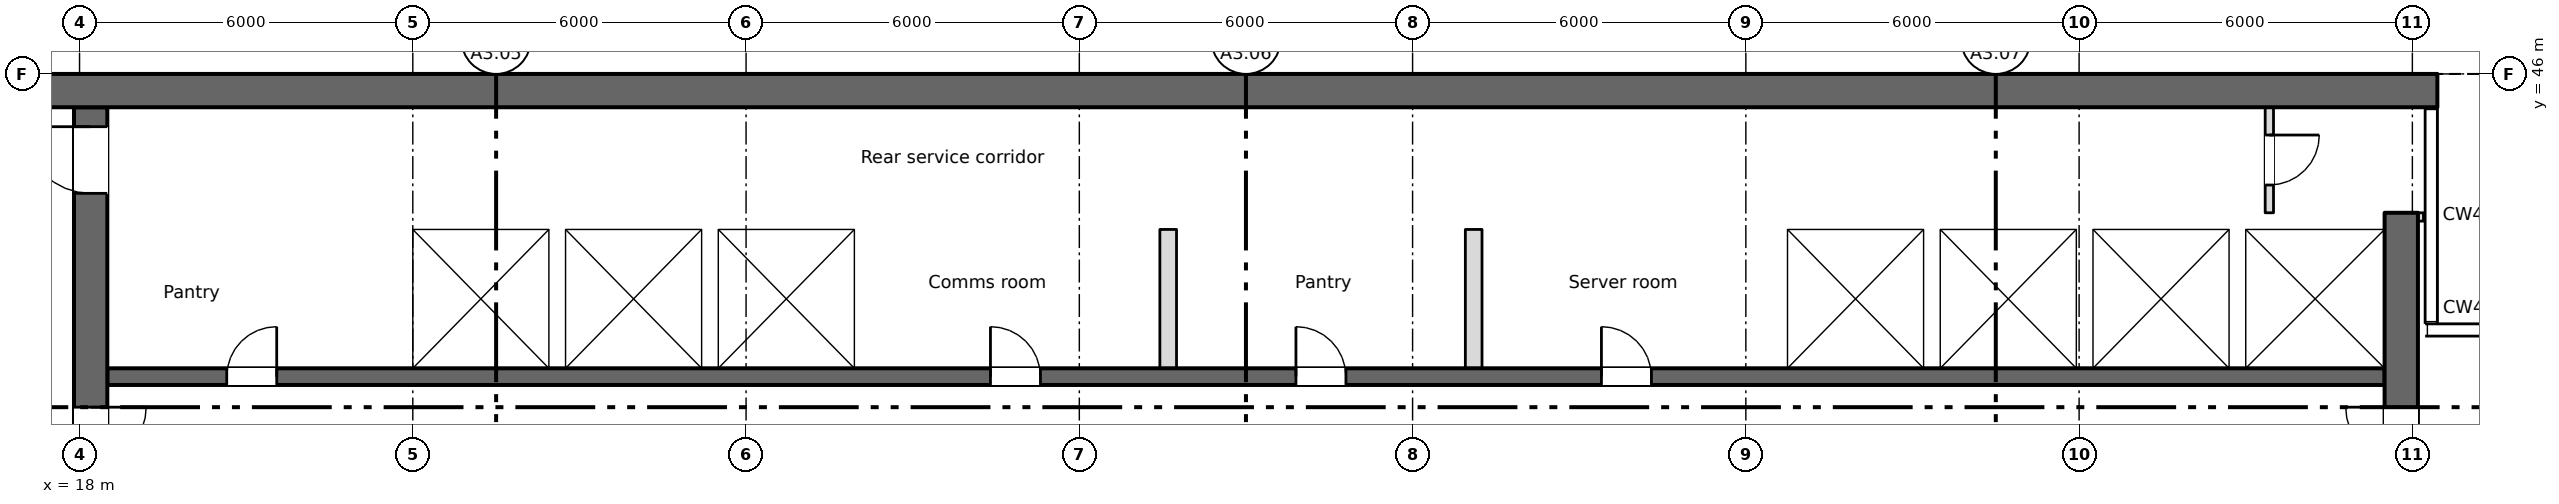
"""IFC4 building model, lengths in metres.
Left out: names, types, materials, properties, quantities, classifications, styles, units other than length and angle.
Written with IfcOpenShell. Run it as: python <this file> out.ifc"""

import sys

from ifc_helpers import new_model, si_unit, direction, frame, frame_2d, origin, place, context, subcontext, project, spatial, rectangle, extrude, element, fill, save


model = new_model("IFC4")
c1 = context("Model", 3, precision=1e-05, world=origin(), true_north=direction((0.0, 1.0)))
c2 = subcontext(c1, "Body", "Model", "MODEL_VIEW")
j1 = project(units=[si_unit("LENGTHUNIT", "METRE"), si_unit("PLANEANGLEUNIT", "RADIAN")], contexts=[c1])
p1 = place(None, origin())
s1 = spatial("IfcSite", under=j1, at=p1, CompositionType="ELEMENT")
p2 = place(p1, origin())
s2 = spatial("IfcBuilding", under=s1, at=p2, CompositionType="ELEMENT")
p3 = place(p2, frame((0.0, 0.0, 246.95)))
s3 = spatial("IfcBuildingStorey", under=s2, at=p3, CompositionType="ELEMENT", Elevation=246.95)
p4 = place(p3, frame((11.55, 45.7, 0.0), z_axis=(0.0, 0.0, 1.0), x_axis=(1.0, 0.0, 0.0)))
e1 = element("IfcWall", 1, at=p4, inside=s3, PredefinedType="SHEAR", context=c2, shape_type="SweptSolid", body=[
    extrude(rectangle(XDim=48.9, YDim=0.6, at=frame_2d((24.45, 0.0))), origin(), (0.0, 0.0, 1.0), 3.4),
])
p5 = place(p4, frame((1.2, 0.0, 0.6)))
e2 = element("IfcOpeningElement", 2, at=p5, cuts=e1, PredefinedType="OPENING", context=c2, shape_type="SweptSolid", body=[
    extrude(rectangle(XDim=0.6, YDim=2.4, at=frame_2d((0.3, 1.2))), frame((0.0, 0.31, 0.0), z_axis=(0.0, -1.0, 0.0), x_axis=(1.0, 0.0, 0.0)), (0.0, 0.0, 1.0), 0.62),
])
p6 = place(p3, frame((18.2, 28.4, 0.0), z_axis=(0.0, 0.0, 1.0), x_axis=(0.0, 1.0, 0.0)))
e3 = element("IfcWall", 3, at=p6, inside=s3, PredefinedType="SHEAR", context=c2, shape_type="SweptSolid", body=[
    extrude(rectangle(XDim=17.0, YDim=0.6, at=frame_2d((8.5, 0.0))), origin(), (0.0, 0.0, 1.0), 3.4),
])
p7 = place(p6, frame((9.6, 0.0, 0.0)))
e4 = element("IfcOpeningElement", 4, at=p7, cuts=e3, PredefinedType="OPENING", context=c2, shape_type="SweptSolid", body=[
    extrude(rectangle(XDim=2.0, YDim=2.1, at=frame_2d((1.0, 1.05))), frame((0.0, 0.31, 0.0), z_axis=(0.0, -1.0, 0.0), x_axis=(1.0, 0.0, 0.0)), (0.0, 0.0, 1.0), 0.62),
])
p8 = place(p6, frame((15.45, 0.0, 0.0)))
e5 = element("IfcOpeningElement", 5, at=p8, cuts=e3, PredefinedType="OPENING", context=c2, shape_type="SweptSolid", body=[
    extrude(rectangle(XDim=1.2, YDim=2.1, at=frame_2d((0.6, 1.05))), frame((0.0, 0.31, 0.0), z_axis=(0.0, -1.0, 0.0), x_axis=(1.0, 0.0, 0.0)), (0.0, 0.0, 1.0), 0.62),
])
p9 = place(p3, frame((59.8, 28.4, 0.0), z_axis=(0.0, 0.0, 1.0), x_axis=(0.0, 1.0, 0.0)))
e6 = element("IfcWall", 6, at=p9, inside=s3, PredefinedType="SHEAR", context=c2, shape_type="SweptSolid", body=[
    extrude(rectangle(XDim=15.1, YDim=0.6, at=frame_2d((7.55, 0.0))), origin(), (0.0, 0.0, 1.0), 3.4),
])
p10 = place(p9, frame((9.6, 0.0, 0.0)))
e7 = element("IfcOpeningElement", 7, at=p10, cuts=e6, PredefinedType="OPENING", context=c2, shape_type="SweptSolid", body=[
    extrude(rectangle(XDim=2.0, YDim=2.1, at=frame_2d((1.0, 1.05))), frame((0.0, 0.31, 0.0), z_axis=(0.0, -1.0, 0.0), x_axis=(1.0, 0.0, 0.0)), (0.0, 0.0, 1.0), 0.62),
])
p11 = place(p3, frame((18.5, 40.55, 0.0), z_axis=(0.0, 0.0, 1.0), x_axis=(1.0, 0.0, 0.0)))
e8 = element("IfcWall", 8, at=p11, inside=s3, PredefinedType="SHEAR", context=c2, shape_type="SweptSolid", body=[
    extrude(rectangle(XDim=41.0, YDim=0.3, at=frame_2d((20.5, 0.0))), origin(), (0.0, 0.0, 1.0), 3.4),
])
p12 = place(p11, frame((2.15, 0.0, 0.0)))
e9 = element("IfcOpeningElement", 9, at=p12, cuts=e8, PredefinedType="OPENING", context=c2, shape_type="SweptSolid", body=[
    extrude(rectangle(XDim=0.9, YDim=2.1, at=frame_2d((0.45, 1.05))), frame((0.0, 0.16, 0.0), z_axis=(0.0, -1.0, 0.0), x_axis=(1.0, 0.0, 0.0)), (0.0, 0.0, 1.0), 0.32),
])
p13 = place(p11, frame((15.9, 0.0, 0.0)))
e10 = element("IfcOpeningElement", 10, at=p13, cuts=e8, PredefinedType="OPENING", context=c2, shape_type="SweptSolid", body=[
    extrude(rectangle(XDim=0.9, YDim=2.1, at=frame_2d((0.45, 1.05))), frame((0.0, 0.16, 0.0), z_axis=(0.0, -1.0, 0.0), x_axis=(1.0, 0.0, 0.0)), (0.0, 0.0, 1.0), 0.32),
])
p14 = place(p11, frame((21.4, 0.0, 0.0)))
e11 = element("IfcOpeningElement", 11, at=p14, cuts=e8, PredefinedType="OPENING", context=c2, shape_type="SweptSolid", body=[
    extrude(rectangle(XDim=0.9, YDim=2.1, at=frame_2d((0.45, 1.05))), frame((0.0, 0.16, 0.0), z_axis=(0.0, -1.0, 0.0), x_axis=(1.0, 0.0, 0.0)), (0.0, 0.0, 1.0), 0.32),
])
p15 = place(p11, frame((26.9, 0.0, 0.0)))
e12 = element("IfcOpeningElement", 12, at=p15, cuts=e8, PredefinedType="OPENING", context=c2, shape_type="SweptSolid", body=[
    extrude(rectangle(XDim=0.9, YDim=2.1, at=frame_2d((0.45, 1.05))), frame((0.0, 0.16, 0.0), z_axis=(0.0, -1.0, 0.0), x_axis=(1.0, 0.0, 0.0)), (0.0, 0.0, 1.0), 0.32),
])
p16 = place(p11, frame((6.175, 0.0, 0.0)))
e13 = element("IfcOpeningElement", 13, at=p16, cuts=e8, PredefinedType="OPENING", context=c2, shape_type="SweptSolid", body=[
    extrude(rectangle(XDim=1.1, YDim=2.1, at=frame_2d((0.55, 1.05))), frame((0.0, 0.16, 0.0), z_axis=(0.0, -1.0, 0.0), x_axis=(1.0, 0.0, 0.0)), (0.0, 0.0, 1.0), 0.32),
])
p17 = place(p11, frame((8.925, 0.0, 0.0)))
e14 = element("IfcOpeningElement", 14, at=p17, cuts=e8, PredefinedType="OPENING", context=c2, shape_type="SweptSolid", body=[
    extrude(rectangle(XDim=1.1, YDim=2.1, at=frame_2d((0.55, 1.05))), frame((0.0, 0.16, 0.0), z_axis=(0.0, -1.0, 0.0), x_axis=(1.0, 0.0, 0.0)), (0.0, 0.0, 1.0), 0.32),
])
p18 = place(p11, frame((11.675, 0.0, 0.0)))
e15 = element("IfcOpeningElement", 15, at=p18, cuts=e8, PredefinedType="OPENING", context=c2, shape_type="SweptSolid", body=[
    extrude(rectangle(XDim=1.1, YDim=2.1, at=frame_2d((0.55, 1.05))), frame((0.0, 0.16, 0.0), z_axis=(0.0, -1.0, 0.0), x_axis=(1.0, 0.0, 0.0)), (0.0, 0.0, 1.0), 0.32),
])
p19 = place(p11, frame((30.925, 0.0, 0.0)))
e16 = element("IfcOpeningElement", 16, at=p19, cuts=e8, PredefinedType="OPENING", context=c2, shape_type="SweptSolid", body=[
    extrude(rectangle(XDim=1.1, YDim=2.1, at=frame_2d((0.55, 1.05))), frame((0.0, 0.16, 0.0), z_axis=(0.0, -1.0, 0.0), x_axis=(1.0, 0.0, 0.0)), (0.0, 0.0, 1.0), 0.32),
])
p20 = place(p11, frame((33.675, 0.0, 0.0)))
e17 = element("IfcOpeningElement", 17, at=p20, cuts=e8, PredefinedType="OPENING", context=c2, shape_type="SweptSolid", body=[
    extrude(rectangle(XDim=1.1, YDim=2.1, at=frame_2d((0.55, 1.05))), frame((0.0, 0.16, 0.0), z_axis=(0.0, -1.0, 0.0), x_axis=(1.0, 0.0, 0.0)), (0.0, 0.0, 1.0), 0.32),
])
p21 = place(p11, frame((36.375, 0.0, 0.0)))
e18 = element("IfcOpeningElement", 18, at=p21, cuts=e8, PredefinedType="OPENING", context=c2, shape_type="SweptSolid", body=[
    extrude(rectangle(XDim=1.2, YDim=2.1, at=frame_2d((0.6, 1.05))), frame((0.0, 0.16, 0.0), z_axis=(0.0, -1.0, 0.0), x_axis=(1.0, 0.0, 0.0)), (0.0, 0.0, 1.0), 0.32),
])
p22 = place(p11, frame((39.15, 0.0, 0.0)))
e19 = element("IfcOpeningElement", 19, at=p22, cuts=e8, PredefinedType="OPENING", context=c2, shape_type="SweptSolid", body=[
    extrude(rectangle(XDim=1.2, YDim=2.1, at=frame_2d((0.6, 1.05))), frame((0.0, 0.16, 0.0), z_axis=(0.0, -1.0, 0.0), x_axis=(1.0, 0.0, 0.0)), (0.0, 0.0, 1.0), 0.32),
])
p23 = place(p3, frame((18.5, 43.35, 0.0), z_axis=(0.0, 0.0, 1.0), x_axis=(1.0, 0.0, 0.0)))
e20 = element("IfcWall", 20, at=p23, inside=s3, PredefinedType="SHEAR", context=c2, shape_type="SweptSolid", body=[
    extrude(rectangle(XDim=41.0, YDim=0.3, at=frame_2d((20.5, 0.0))), origin(), (0.0, 0.0, 1.0), 3.4),
])
for number, where, z_axis, x_axis in (
    (21, (23.85, 40.7, 0.0), (0.0, 0.0, 1.0), (0.0, 1.0, 0.0)),
    (22, (26.6, 40.7, 0.0), (0.0, 0.0, 1.0), (0.0, 1.0, 0.0)),
    (23, (29.35, 40.7, 0.0), (0.0, 0.0, 1.0), (0.0, 1.0, 0.0)),
    (24, (32.1, 40.7, 0.0), (0.0, 0.0, 1.0), (0.0, 1.0, 0.0)),
    (25, (48.6, 40.7, 0.0), (0.0, 0.0, 1.0), (0.0, 1.0, 0.0)),
    (26, (51.35, 40.7, 0.0), (0.0, 0.0, 1.0), (0.0, 1.0, 0.0)),
    (27, (54.1, 40.7, 0.0), (0.0, 0.0, 1.0), (0.0, 1.0, 0.0)),
    (28, (56.85, 40.7, 0.0), (0.0, 0.0, 1.0), (0.0, 1.0, 0.0)),
):
    element("IfcWall", number, at=place(p3, frame(where, z_axis=z_axis, x_axis=x_axis)), inside=s3, PredefinedType="SHEAR", context=c2, shape_type="SweptSolid", body=[
        extrude(rectangle(XDim=2.5, YDim=0.3, at=frame_2d((1.25, 0.0))), origin(), (0.0, 0.0, 1.0), 3.4),
    ])
p24 = place(p3, frame((57.425, 45.4, 0.0), z_axis=(0.0, 0.0, 1.0), x_axis=(0.0, -1.0, 0.0)))
e29 = element("IfcWall", 29, at=p24, inside=s3, PredefinedType="PARTITIONING", context=c2, shape_type="SweptSolid", body=[
    extrude(rectangle(XDim=1.9, YDim=0.15, at=frame_2d((0.95, 0.0))), origin(), (0.0, 0.0, 1.0), 3.4),
])
p25 = place(p24, frame((0.5, 0.0, 0.0)))
e30 = element("IfcOpeningElement", 30, at=p25, cuts=e29, PredefinedType="OPENING", context=c2, shape_type="SweptSolid", body=[
    extrude(rectangle(XDim=0.9, YDim=2.1, at=frame_2d((0.45, 1.05))), frame((0.0, 0.085, 0.0), z_axis=(0.0, -1.0, 0.0), x_axis=(1.0, 0.0, 0.0)), (0.0, 0.0, 1.0), 0.17),
])
p26 = place(p3, frame((60.15, 43.35, 0.0), z_axis=(0.0, 0.0, 1.0), x_axis=(0.0, 1.0, 0.0)))
e31 = element("IfcWall", 31, at=p26, inside=s3, PredefinedType="PARTITIONING", context=c2, shape_type="SweptSolid", body=[
    extrude(rectangle(XDim=0.15, YDim=0.1, at=frame_2d((0.075, 0.0))), origin(), (0.0, 0.0, 1.0), 3.4),
])
for number, where, z_axis, x_axis in (
    (32, (37.6, 40.7, 0.0), (0.0, 0.0, 1.0), (0.0, 1.0, 0.0)),
    (33, (43.1, 40.7, 0.0), (0.0, 0.0, 1.0), (0.0, 1.0, 0.0)),
):
    element("IfcWall", number, at=place(p3, frame(where, z_axis=z_axis, x_axis=x_axis)), inside=s3, PredefinedType="PARTITIONING", context=c2, shape_type="SweptSolid", body=[
        extrude(rectangle(XDim=2.5, YDim=0.3, at=frame_2d((1.25, 0.0))), origin(), (0.0, 0.0, 1.0), 3.4),
    ])
p27 = place(p25, origin())
e34 = element("IfcDoor", 34, at=p27, inside=s3, OperationType="SINGLE_SWING_LEFT", PredefinedType="DOOR", context=c2, shape_type="SweptSolid", body=[
    extrude(rectangle(XDim=0.9, YDim=2.1, at=frame_2d((0.45, 1.05))), frame((0.0, 0.025, 0.0), z_axis=(0.0, -1.0, 0.0), x_axis=(1.0, 0.0, 0.0)), (0.0, 0.0, 1.0), 0.05),
])
fill(e30, e34)
p28 = place(p12, origin())
e35 = element("IfcDoor", 35, at=p28, inside=s3, OperationType="SINGLE_SWING_RIGHT", PredefinedType="DOOR", context=c2, shape_type="SweptSolid", body=[
    extrude(rectangle(XDim=0.9, YDim=2.1, at=frame_2d((0.45, 1.05))), frame((0.0, 0.025, 0.0), z_axis=(0.0, -1.0, 0.0), x_axis=(1.0, 0.0, 0.0)), (0.0, 0.0, 1.0), 0.05),
])
fill(e9, e35)
p29 = place(p13, origin())
e36 = element("IfcDoor", 36, at=p29, inside=s3, OperationType="SINGLE_SWING_LEFT", PredefinedType="DOOR", context=c2, shape_type="SweptSolid", body=[
    extrude(rectangle(XDim=0.9, YDim=2.1, at=frame_2d((0.45, 1.05))), frame((0.0, 0.025, 0.0), z_axis=(0.0, -1.0, 0.0), x_axis=(1.0, 0.0, 0.0)), (0.0, 0.0, 1.0), 0.05),
])
fill(e10, e36)
p30 = place(p14, origin())
e37 = element("IfcDoor", 37, at=p30, inside=s3, OperationType="SINGLE_SWING_LEFT", PredefinedType="DOOR", context=c2, shape_type="SweptSolid", body=[
    extrude(rectangle(XDim=0.9, YDim=2.1, at=frame_2d((0.45, 1.05))), frame((0.0, 0.025, 0.0), z_axis=(0.0, -1.0, 0.0), x_axis=(1.0, 0.0, 0.0)), (0.0, 0.0, 1.0), 0.05),
])
fill(e11, e37)
p31 = place(p15, origin())
e38 = element("IfcDoor", 38, at=p31, inside=s3, OperationType="SINGLE_SWING_LEFT", PredefinedType="DOOR", context=c2, shape_type="SweptSolid", body=[
    extrude(rectangle(XDim=0.9, YDim=2.1, at=frame_2d((0.45, 1.05))), frame((0.0, 0.025, 0.0), z_axis=(0.0, -1.0, 0.0), x_axis=(1.0, 0.0, 0.0)), (0.0, 0.0, 1.0), 0.05),
])
fill(e12, e38)
p32 = place(p16, origin())
e39 = element("IfcDoor", 39, at=p32, inside=s3, OperationType="SLIDING_TO_LEFT", PredefinedType="DOOR", context=c2, shape_type="SweptSolid", body=[
    extrude(rectangle(XDim=1.1, YDim=2.1, at=frame_2d((0.55, 1.05))), frame((0.0, 0.025, 0.0), z_axis=(0.0, -1.0, 0.0), x_axis=(1.0, 0.0, 0.0)), (0.0, 0.0, 1.0), 0.05),
])
fill(e13, e39)
p33 = place(p17, origin())
e40 = element("IfcDoor", 40, at=p33, inside=s3, OperationType="SLIDING_TO_LEFT", PredefinedType="DOOR", context=c2, shape_type="SweptSolid", body=[
    extrude(rectangle(XDim=1.1, YDim=2.1, at=frame_2d((0.55, 1.05))), frame((0.0, 0.025, 0.0), z_axis=(0.0, -1.0, 0.0), x_axis=(1.0, 0.0, 0.0)), (0.0, 0.0, 1.0), 0.05),
])
fill(e14, e40)
p34 = place(p18, origin())
e41 = element("IfcDoor", 41, at=p34, inside=s3, OperationType="SLIDING_TO_LEFT", PredefinedType="DOOR", context=c2, shape_type="SweptSolid", body=[
    extrude(rectangle(XDim=1.1, YDim=2.1, at=frame_2d((0.55, 1.05))), frame((0.0, 0.025, 0.0), z_axis=(0.0, -1.0, 0.0), x_axis=(1.0, 0.0, 0.0)), (0.0, 0.0, 1.0), 0.05),
])
fill(e15, e41)
p35 = place(p19, origin())
e42 = element("IfcDoor", 42, at=p35, inside=s3, OperationType="SLIDING_TO_LEFT", PredefinedType="DOOR", context=c2, shape_type="SweptSolid", body=[
    extrude(rectangle(XDim=1.1, YDim=2.1, at=frame_2d((0.55, 1.05))), frame((0.0, 0.025, 0.0), z_axis=(0.0, -1.0, 0.0), x_axis=(1.0, 0.0, 0.0)), (0.0, 0.0, 1.0), 0.05),
])
fill(e16, e42)
p36 = place(p20, origin())
e43 = element("IfcDoor", 43, at=p36, inside=s3, OperationType="SLIDING_TO_LEFT", PredefinedType="DOOR", context=c2, shape_type="SweptSolid", body=[
    extrude(rectangle(XDim=1.1, YDim=2.1, at=frame_2d((0.55, 1.05))), frame((0.0, 0.025, 0.0), z_axis=(0.0, -1.0, 0.0), x_axis=(1.0, 0.0, 0.0)), (0.0, 0.0, 1.0), 0.05),
])
fill(e17, e43)
p37 = place(p21, origin())
e44 = element("IfcDoor", 44, at=p37, inside=s3, OperationType="SLIDING_TO_LEFT", PredefinedType="DOOR", context=c2, shape_type="SweptSolid", body=[
    extrude(rectangle(XDim=1.2, YDim=2.1, at=frame_2d((0.6, 1.05))), frame((0.0, 0.025, 0.0), z_axis=(0.0, -1.0, 0.0), x_axis=(1.0, 0.0, 0.0)), (0.0, 0.0, 1.0), 0.05),
])
fill(e18, e44)
p38 = place(p22, origin())
e45 = element("IfcDoor", 45, at=p38, inside=s3, OperationType="SLIDING_TO_LEFT", PredefinedType="DOOR", context=c2, shape_type="SweptSolid", body=[
    extrude(rectangle(XDim=1.2, YDim=2.1, at=frame_2d((0.6, 1.05))), frame((0.0, 0.025, 0.0), z_axis=(0.0, -1.0, 0.0), x_axis=(1.0, 0.0, 0.0)), (0.0, 0.0, 1.0), 0.05),
])
fill(e19, e45)
p39 = place(p7, origin())
e46 = element("IfcDoor", 46, at=p39, inside=s3, OperationType="DOUBLE_DOOR_SINGLE_SWING", PredefinedType="DOOR", context=c2, shape_type="SweptSolid", body=[
    extrude(rectangle(XDim=2.0, YDim=2.1, at=frame_2d((1.0, 1.05))), frame((0.0, 0.025, 0.0), z_axis=(0.0, -1.0, 0.0), x_axis=(1.0, 0.0, 0.0)), (0.0, 0.0, 1.0), 0.05),
])
fill(e4, e46)
p40 = place(p10, origin())
e47 = element("IfcDoor", 47, at=p40, inside=s3, OperationType="DOUBLE_DOOR_SINGLE_SWING", PredefinedType="DOOR", context=c2, shape_type="SweptSolid", body=[
    extrude(rectangle(XDim=2.0, YDim=2.1, at=frame_2d((1.0, 1.05))), frame((0.0, 0.025, 0.0), z_axis=(0.0, -1.0, 0.0), x_axis=(1.0, 0.0, 0.0)), (0.0, 0.0, 1.0), 0.05),
])
fill(e7, e47)
p41 = place(p8, origin())
e48 = element("IfcDoor", 48, at=p41, inside=s3, OperationType="SINGLE_SWING_RIGHT", PredefinedType="DOOR", context=c2, shape_type="SweptSolid", body=[
    extrude(rectangle(XDim=1.2, YDim=2.1, at=frame_2d((0.6, 1.05))), frame((0.0, 0.025, 0.0), z_axis=(0.0, -1.0, 0.0), x_axis=(1.0, 0.0, 0.0)), (0.0, 0.0, 1.0), 0.05),
])
fill(e5, e48)
save(model, sys.argv[1])
